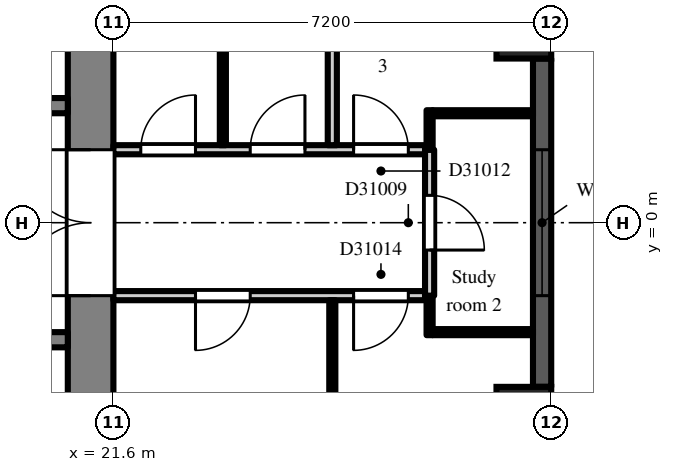
"""IFC4 building model, lengths in metres.
Left out: names, types, materials, properties, quantities, classifications, styles, units other than length and angle.
Written with IfcOpenShell. Run it as: python <this file> out.ifc"""

import sys

from ifc_helpers import new_model, si_unit, direction, frame, frame_2d, origin, origin_2d, place, context, subcontext, project, spatial, rectangle, extrude, element, fill, save


model = new_model("IFC4")
c1 = context("Model", 3, precision=1e-05, world=origin(), true_north=direction((0.0, 1.0)))
c2 = subcontext(c1, "Body", "Model", "MODEL_VIEW")
j1 = project(units=[si_unit("LENGTHUNIT", "METRE"), si_unit("PLANEANGLEUNIT", "RADIAN")], contexts=[c1])
p1 = place(None, origin())
s1 = spatial("IfcSite", under=j1, at=p1, CompositionType="ELEMENT")
p2 = place(p1, origin())
s2 = spatial("IfcBuilding", under=s1, at=p2, CompositionType="ELEMENT")
p3 = place(p2, frame((0.0, 0.0, 216.9)))
s3 = spatial("IfcBuildingStorey", under=s2, at=p3, CompositionType="ELEMENT", Elevation=216.9)
for number, where, z_axis, x_axis in (
    (1, (28.35, -3.15, 0.0), (0.0, 0.0, 1.0), (1.0, 0.0, 0.0)),
    (2, (28.35, 3.15, 0.0), (0.0, 0.0, 1.0), (1.0, 0.0, 0.0)),
):
    element("IfcColumn", number, at=place(p3, frame(where, z_axis=z_axis, x_axis=x_axis)), inside=s3, PredefinedType="COLUMN", context=c2, shape_type="SweptSolid", body=[
        extrude(rectangle(XDim=0.9, YDim=0.9, at=origin_2d()), origin(), (0.0, 0.0, 1.0), 3.0),
    ])
p4 = place(p3, frame((28.65, -2.7, 0.0), z_axis=(0.0, 0.0, 1.0), x_axis=(0.0, 1.0, 0.0)))
e3 = element("IfcWall", 3, at=p4, inside=s3, PredefinedType="SOLIDWALL", context=c2, shape_type="SweptSolid", body=[
    extrude(rectangle(XDim=5.4, YDim=0.3, at=frame_2d((2.7, 0.0))), origin(), (0.0, 0.0, 1.0), 2.3),
])
p5 = place(p4, frame((1.5, 0.0, 0.2)))
e4 = element("IfcOpeningElement", 4, at=p5, cuts=e3, PredefinedType="OPENING", context=c2, shape_type="SweptSolid", body=[
    extrude(rectangle(XDim=2.4, YDim=1.85, at=frame_2d((1.2, 0.925))), frame((0.0, 0.16, 0.0), z_axis=(0.0, -1.0, 0.0), x_axis=(1.0, 0.0, 0.0)), (0.0, 0.0, 1.0), 0.32),
])
p6 = place(p3, frame((21.225, -7.2, 0.0), z_axis=(0.0, 0.0, 1.0), x_axis=(0.0, 1.0, 0.0)))
e5 = element("IfcWall", 5, at=p6, inside=s3, PredefinedType="SHEAR", context=c2, shape_type="SweptSolid", body=[
    extrude(rectangle(XDim=14.4, YDim=0.75, at=frame_2d((7.2, 0.0))), origin(), (0.0, 0.0, 1.0), 2.6),
])
p7 = place(p6, frame((6.0, 0.0, 0.0)))
e6 = element("IfcOpeningElement", 6, at=p7, cuts=e5, PredefinedType="OPENING", context=c2, shape_type="SweptSolid", body=[
    extrude(rectangle(XDim=2.4, YDim=2.2, at=frame_2d((1.2, 1.1))), frame((0.0, 0.385, 0.0), z_axis=(0.0, -1.0, 0.0), x_axis=(1.0, 0.0, 0.0)), (0.0, 0.0, 1.0), 0.77),
])
p8 = place(p3, frame((7.9, 1.925, 0.0), z_axis=(0.0, 0.0, 1.0), x_axis=(1.0, 0.0, 0.0)))
e7 = element("IfcWall", 7, at=p8, inside=s3, PredefinedType="SHEAR", context=c2, shape_type="SweptSolid", body=[
    extrude(rectangle(XDim=12.95, YDim=0.25, at=frame_2d((6.475, 0.0))), origin(), (0.0, 0.0, 1.0), 2.6),
])
p9 = place(p8, frame((4.825, 0.0, 0.0)))
e8 = element("IfcOpeningElement", 8, at=p9, cuts=e7, PredefinedType="OPENING", context=c2, shape_type="SweptSolid", body=[
    extrude(rectangle(XDim=1.1, YDim=2.1, at=frame_2d((0.55, 1.05))), frame((0.0, 0.135, 0.0), z_axis=(0.0, -1.0, 0.0), x_axis=(1.0, 0.0, 0.0)), (0.0, 0.0, 1.0), 0.27),
])
p10 = place(p8, frame((7.025, 0.0, 0.0)))
e9 = element("IfcOpeningElement", 9, at=p10, cuts=e7, PredefinedType="OPENING", context=c2, shape_type="SweptSolid", body=[
    extrude(rectangle(XDim=1.1, YDim=2.1, at=frame_2d((0.55, 1.05))), frame((0.0, 0.135, 0.0), z_axis=(0.0, -1.0, 0.0), x_axis=(1.0, 0.0, 0.0)), (0.0, 0.0, 1.0), 0.27),
])
p11 = place(p8, frame((9.225, 0.0, 0.0)))
e10 = element("IfcOpeningElement", 10, at=p11, cuts=e7, PredefinedType="OPENING", context=c2, shape_type="SweptSolid", body=[
    extrude(rectangle(XDim=1.1, YDim=2.1, at=frame_2d((0.55, 1.05))), frame((0.0, 0.135, 0.0), z_axis=(0.0, -1.0, 0.0), x_axis=(1.0, 0.0, 0.0)), (0.0, 0.0, 1.0), 0.27),
])
p12 = place(p8, frame((0.525, 0.0, 0.0)))
e11 = element("IfcOpeningElement", 11, at=p12, cuts=e7, PredefinedType="OPENING", context=c2, shape_type="SweptSolid", body=[
    extrude(rectangle(XDim=0.9, YDim=2.1, at=frame_2d((0.45, 1.05))), frame((0.0, 0.135, 0.0), z_axis=(0.0, -1.0, 0.0), x_axis=(1.0, 0.0, 0.0)), (0.0, 0.0, 1.0), 0.27),
])
p13 = place(p8, frame((2.625, 0.0, 0.0)))
e12 = element("IfcOpeningElement", 12, at=p13, cuts=e7, PredefinedType="OPENING", context=c2, shape_type="SweptSolid", body=[
    extrude(rectangle(XDim=1.1, YDim=2.1, at=frame_2d((0.55, 1.05))), frame((0.0, 0.135, 0.0), z_axis=(0.0, -1.0, 0.0), x_axis=(1.0, 0.0, 0.0)), (0.0, 0.0, 1.0), 0.27),
])
p14 = place(p8, frame((11.525, 0.0, 0.0)))
e13 = element("IfcOpeningElement", 13, at=p14, cuts=e7, PredefinedType="OPENING", context=c2, shape_type="SweptSolid", body=[
    extrude(rectangle(XDim=0.9, YDim=2.1, at=frame_2d((0.45, 1.05))), frame((0.0, 0.135, 0.0), z_axis=(0.0, -1.0, 0.0), x_axis=(1.0, 0.0, 0.0)), (0.0, 0.0, 1.0), 0.27),
])
p15 = place(p3, frame((7.9, -1.925, 0.0), z_axis=(0.0, 0.0, 1.0), x_axis=(1.0, 0.0, 0.0)))
e14 = element("IfcWall", 14, at=p15, inside=s3, PredefinedType="SHEAR", context=c2, shape_type="SweptSolid", body=[
    extrude(rectangle(XDim=12.95, YDim=0.25, at=frame_2d((6.475, 0.0))), origin(), (0.0, 0.0, 1.0), 2.6),
])
p16 = place(p15, frame((0.525, 0.0, 0.0)))
e15 = element("IfcOpeningElement", 15, at=p16, cuts=e14, PredefinedType="OPENING", context=c2, shape_type="SweptSolid", body=[
    extrude(rectangle(XDim=0.9, YDim=2.1, at=frame_2d((0.45, 1.05))), frame((0.0, 0.135, 0.0), z_axis=(0.0, -1.0, 0.0), x_axis=(1.0, 0.0, 0.0)), (0.0, 0.0, 1.0), 0.27),
])
p17 = place(p15, frame((2.625, 0.0, 0.0)))
e16 = element("IfcOpeningElement", 16, at=p17, cuts=e14, PredefinedType="OPENING", context=c2, shape_type="SweptSolid", body=[
    extrude(rectangle(XDim=1.1, YDim=2.1, at=frame_2d((0.55, 1.05))), frame((0.0, 0.135, 0.0), z_axis=(0.0, -1.0, 0.0), x_axis=(1.0, 0.0, 0.0)), (0.0, 0.0, 1.0), 0.27),
])
p18 = place(p15, frame((8.225, 0.0, 0.0)))
e17 = element("IfcOpeningElement", 17, at=p18, cuts=e14, PredefinedType="OPENING", context=c2, shape_type="SweptSolid", body=[
    extrude(rectangle(XDim=0.9, YDim=2.1, at=frame_2d((0.45, 1.05))), frame((0.0, 0.135, 0.0), z_axis=(0.0, -1.0, 0.0), x_axis=(1.0, 0.0, 0.0)), (0.0, 0.0, 1.0), 0.27),
])
p19 = place(p3, frame((21.6, -1.2, 0.0), z_axis=(0.0, 0.0, 1.0), x_axis=(1.0, 0.0, 0.0)))
e18 = element("IfcWall", 18, at=p19, inside=s3, PredefinedType="PARTITIONING", context=c2, shape_type="SweptSolid", body=[
    extrude(rectangle(XDim=5.125, YDim=0.15, at=frame_2d((2.562, 0.0))), origin(), (0.0, 0.0, 1.0), 2.6),
])
p20 = place(p19, frame((1.35, 0.0, 0.0)))
e19 = element("IfcOpeningElement", 19, at=p20, cuts=e18, PredefinedType="OPENING", context=c2, shape_type="SweptSolid", body=[
    extrude(rectangle(XDim=0.9, YDim=2.1, at=frame_2d((0.45, 1.05))), frame((0.0, 0.085, 0.0), z_axis=(0.0, -1.0, 0.0), x_axis=(1.0, 0.0, 0.0)), (0.0, 0.0, 1.0), 0.17),
])
p21 = place(p19, frame((3.95, 0.0, 0.0)))
e20 = element("IfcOpeningElement", 20, at=p21, cuts=e18, PredefinedType="OPENING", context=c2, shape_type="SweptSolid", body=[
    extrude(rectangle(XDim=0.9, YDim=2.1, at=frame_2d((0.45, 1.05))), frame((0.0, 0.085, 0.0), z_axis=(0.0, -1.0, 0.0), x_axis=(1.0, 0.0, 0.0)), (0.0, 0.0, 1.0), 0.17),
])
p22 = place(p3, frame((21.6, 1.2, 0.0), z_axis=(0.0, 0.0, 1.0), x_axis=(1.0, 0.0, 0.0)))
e21 = element("IfcWall", 21, at=p22, inside=s3, PredefinedType="PARTITIONING", context=c2, shape_type="SweptSolid", body=[
    extrude(rectangle(XDim=5.125, YDim=0.15, at=frame_2d((2.562, 0.0))), origin(), (0.0, 0.0, 1.0), 2.6),
])
p23 = place(p22, frame((0.45, 0.0, 0.0)))
e22 = element("IfcOpeningElement", 22, at=p23, cuts=e21, PredefinedType="OPENING", context=c2, shape_type="SweptSolid", body=[
    extrude(rectangle(XDim=0.9, YDim=2.1, at=frame_2d((0.45, 1.05))), frame((0.0, 0.085, 0.0), z_axis=(0.0, -1.0, 0.0), x_axis=(1.0, 0.0, 0.0)), (0.0, 0.0, 1.0), 0.17),
])
p24 = place(p22, frame((2.25, 0.0, 0.0)))
e23 = element("IfcOpeningElement", 23, at=p24, cuts=e21, PredefinedType="OPENING", context=c2, shape_type="SweptSolid", body=[
    extrude(rectangle(XDim=0.9, YDim=2.1, at=frame_2d((0.45, 1.05))), frame((0.0, 0.085, 0.0), z_axis=(0.0, -1.0, 0.0), x_axis=(1.0, 0.0, 0.0)), (0.0, 0.0, 1.0), 0.17),
])
p25 = place(p22, frame((3.95, 0.0, 0.0)))
e24 = element("IfcOpeningElement", 24, at=p25, cuts=e21, PredefinedType="OPENING", context=c2, shape_type="SweptSolid", body=[
    extrude(rectangle(XDim=0.9, YDim=2.1, at=frame_2d((0.45, 1.05))), frame((0.0, 0.085, 0.0), z_axis=(0.0, -1.0, 0.0), x_axis=(1.0, 0.0, 0.0)), (0.0, 0.0, 1.0), 0.17),
])
p26 = place(p3, frame((23.4, 1.275, 0.0), z_axis=(0.0, 0.0, 1.0), x_axis=(0.0, 1.0, 0.0)))
e25 = element("IfcWall", 25, at=p26, inside=s3, PredefinedType="PARTITIONING", context=c2, shape_type="SweptSolid", body=[
    extrude(rectangle(XDim=5.625, YDim=0.1, at=frame_2d((2.812, 0.0))), origin(), (0.0, 0.0, 1.0), 2.6),
])
p27 = place(p3, frame((25.2, -5.1, 0.0), z_axis=(0.0, 0.0, 1.0), x_axis=(0.0, 1.0, 0.0)))
e26 = element("IfcWall", 26, at=p27, inside=s3, PredefinedType="PARTITIONING", context=c2, shape_type="SweptSolid", body=[
    extrude(rectangle(XDim=3.825, YDim=0.1, at=frame_2d((1.913, 0.0))), origin(), (0.0, 0.0, 1.0), 2.6),
])
p28 = place(p3, frame((25.2, 1.275, 0.0), z_axis=(0.0, 0.0, 1.0), x_axis=(0.0, 1.0, 0.0)))
e27 = element("IfcWall", 27, at=p28, inside=s3, PredefinedType="PARTITIONING", context=c2, shape_type="SweptSolid", body=[
    extrude(rectangle(XDim=3.825, YDim=0.15, at=frame_2d((1.913, 0.0))), origin(), (0.0, 0.0, 1.0), 2.6),
])
p29 = place(p3, frame((26.8, -1.85, 0.0), z_axis=(0.0, 0.0, 1.0), x_axis=(0.0, 1.0, 0.0)))
e28 = element("IfcWall", 28, at=p29, inside=s3, PredefinedType="PARTITIONING", context=c2, shape_type="SweptSolid", body=[
    extrude(rectangle(XDim=0.65, YDim=0.1, at=frame_2d((0.325, 0.0))), origin(), (0.0, 0.0, 1.0), 2.6),
])
p30 = place(p3, frame((26.85, -1.8, 0.0), z_axis=(0.0, 0.0, 1.0), x_axis=(1.0, 0.0, 0.0)))
e29 = element("IfcWall", 29, at=p30, inside=s3, PredefinedType="PARTITIONING", context=c2, shape_type="SweptSolid", body=[
    extrude(rectangle(XDim=1.65, YDim=0.1, at=frame_2d((0.825, 0.0))), origin(), (0.0, 0.0, 1.0), 2.6),
])
p31 = place(p3, frame((26.8, -1.2, 0.0), z_axis=(0.0, 0.0, 1.0), x_axis=(0.0, 1.0, 0.0)))
e30 = element("IfcWall", 30, at=p31, inside=s3, PredefinedType="PARTITIONING", context=c2, shape_type="SweptSolid", body=[
    extrude(rectangle(XDim=2.4, YDim=0.15, at=frame_2d((1.2, 0.0))), origin(), (0.0, 0.0, 1.0), 2.6),
])
p32 = place(p31, frame((0.75, 0.0, 0.0)))
e31 = element("IfcOpeningElement", 31, at=p32, cuts=e30, PredefinedType="OPENING", context=c2, shape_type="SweptSolid", body=[
    extrude(rectangle(XDim=0.9, YDim=2.1, at=frame_2d((0.45, 1.05))), frame((0.0, 0.085, 0.0), z_axis=(0.0, -1.0, 0.0), x_axis=(1.0, 0.0, 0.0)), (0.0, 0.0, 1.0), 0.17),
])
p33 = place(p3, frame((26.8, 1.2, 0.0), z_axis=(0.0, 0.0, 1.0), x_axis=(0.0, 1.0, 0.0)))
e32 = element("IfcWall", 32, at=p33, inside=s3, PredefinedType="PARTITIONING", context=c2, shape_type="SweptSolid", body=[
    extrude(rectangle(XDim=0.65, YDim=0.1, at=frame_2d((0.325, 0.0))), origin(), (0.0, 0.0, 1.0), 2.6),
])
p34 = place(p3, frame((26.85, 1.8, 0.0), z_axis=(0.0, 0.0, 1.0), x_axis=(1.0, 0.0, 0.0)))
e33 = element("IfcWall", 33, at=p34, inside=s3, PredefinedType="PARTITIONING", context=c2, shape_type="SweptSolid", body=[
    extrude(rectangle(XDim=1.65, YDim=0.1, at=frame_2d((0.825, 0.0))), origin(), (0.0, 0.0, 1.0), 2.6),
])
p35 = place(p5, origin())
e34 = element("IfcWindow", 34, at=p35, inside=s3, PartitioningType="SINGLE_PANEL", PredefinedType="WINDOW", context=c2, shape_type="SweptSolid", body=[
    extrude(rectangle(XDim=2.4, YDim=1.85, at=frame_2d((1.2, 0.925))), frame((0.0, 0.03, 0.0), z_axis=(0.0, -1.0, 0.0), x_axis=(1.0, 0.0, 0.0)), (0.0, 0.0, 1.0), 0.06),
])
fill(e4, e34)
p36 = place(p7, origin())
e35 = element("IfcDoor", 35, at=p36, inside=s3, OperationType="DOUBLE_DOOR_DOUBLE_SWING", PredefinedType="DOOR", context=c2, shape_type="SweptSolid", body=[
    extrude(rectangle(XDim=2.4, YDim=2.2, at=frame_2d((1.2, 1.1))), frame((0.0, 0.025, 0.0), z_axis=(0.0, -1.0, 0.0), x_axis=(1.0, 0.0, 0.0)), (0.0, 0.0, 1.0), 0.05),
])
fill(e6, e35)
p37 = place(p32, frame((0.9, 0.0, 0.0), z_axis=(0.0, 0.0, 1.0), x_axis=(-1.0, 0.0, 0.0)))
e36 = element("IfcDoor", 36, at=p37, inside=s3, OperationType="SINGLE_SWING_RIGHT", PredefinedType="DOOR", context=c2, shape_type="SweptSolid", body=[
    extrude(rectangle(XDim=0.9, YDim=2.1, at=frame_2d((0.45, 1.05))), frame((0.0, 0.025, 0.0), z_axis=(0.0, -1.0, 0.0), x_axis=(1.0, 0.0, 0.0)), (0.0, 0.0, 1.0), 0.05),
])
fill(e31, e36)
p38 = place(p23, origin())
e37 = element("IfcDoor", 37, at=p38, inside=s3, OperationType="SINGLE_SWING_RIGHT", PredefinedType="DOOR", context=c2, shape_type="SweptSolid", body=[
    extrude(rectangle(XDim=0.9, YDim=2.1, at=frame_2d((0.45, 1.05))), frame((0.0, 0.025, 0.0), z_axis=(0.0, -1.0, 0.0), x_axis=(1.0, 0.0, 0.0)), (0.0, 0.0, 1.0), 0.05),
])
fill(e22, e37)
p39 = place(p24, origin())
e38 = element("IfcDoor", 38, at=p39, inside=s3, OperationType="SINGLE_SWING_RIGHT", PredefinedType="DOOR", context=c2, shape_type="SweptSolid", body=[
    extrude(rectangle(XDim=0.9, YDim=2.1, at=frame_2d((0.45, 1.05))), frame((0.0, 0.025, 0.0), z_axis=(0.0, -1.0, 0.0), x_axis=(1.0, 0.0, 0.0)), (0.0, 0.0, 1.0), 0.05),
])
fill(e23, e38)
p40 = place(p25, origin())
e39 = element("IfcDoor", 39, at=p40, inside=s3, OperationType="SINGLE_SWING_LEFT", PredefinedType="DOOR", context=c2, shape_type="SweptSolid", body=[
    extrude(rectangle(XDim=0.9, YDim=2.1, at=frame_2d((0.45, 1.05))), frame((0.0, 0.025, 0.0), z_axis=(0.0, -1.0, 0.0), x_axis=(1.0, 0.0, 0.0)), (0.0, 0.0, 1.0), 0.05),
])
fill(e24, e39)
p41 = place(p20, frame((0.9, 0.0, 0.0), z_axis=(0.0, 0.0, 1.0), x_axis=(-1.0, 0.0, 0.0)))
e40 = element("IfcDoor", 40, at=p41, inside=s3, OperationType="SINGLE_SWING_RIGHT", PredefinedType="DOOR", context=c2, shape_type="SweptSolid", body=[
    extrude(rectangle(XDim=0.9, YDim=2.1, at=frame_2d((0.45, 1.05))), frame((0.0, 0.025, 0.0), z_axis=(0.0, -1.0, 0.0), x_axis=(1.0, 0.0, 0.0)), (0.0, 0.0, 1.0), 0.05),
])
fill(e19, e40)
p42 = place(p21, frame((0.9, 0.0, 0.0), z_axis=(0.0, 0.0, 1.0), x_axis=(-1.0, 0.0, 0.0)))
e41 = element("IfcDoor", 41, at=p42, inside=s3, OperationType="SINGLE_SWING_RIGHT", PredefinedType="DOOR", context=c2, shape_type="SweptSolid", body=[
    extrude(rectangle(XDim=0.9, YDim=2.1, at=frame_2d((0.45, 1.05))), frame((0.0, 0.025, 0.0), z_axis=(0.0, -1.0, 0.0), x_axis=(1.0, 0.0, 0.0)), (0.0, 0.0, 1.0), 0.05),
])
fill(e20, e41)
save(model, sys.argv[1])
